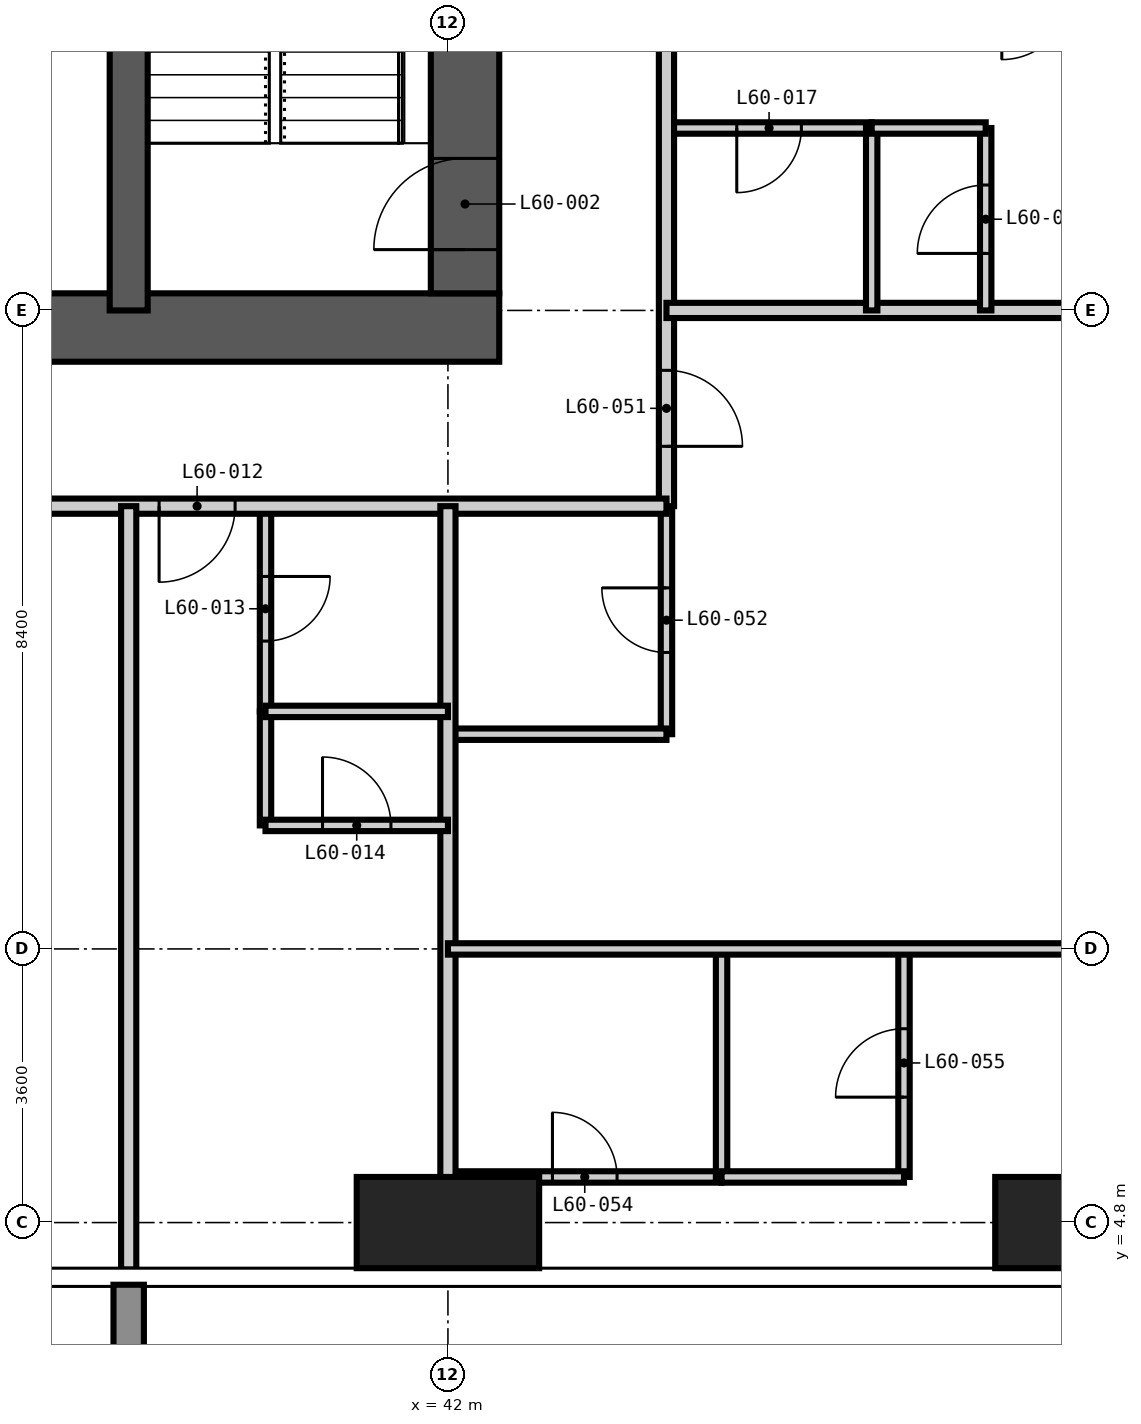
"""IFC4 building model, lengths in metres.
Left out: names, types, materials, properties, quantities, classifications, styles, units other than length and angle.
Written with IfcOpenShell. Run it as: python <this file> out.ifc"""

import sys

from ifc_helpers import new_model, si_unit, direction, frame, frame_2d, origin, origin_2d, place, context, subcontext, project, spatial, rectangle, extrude, element, fill, save


model = new_model("IFC4")
c1 = context("Model", 3, precision=1e-05, world=origin(), true_north=direction((0.0, 1.0)))
c2 = subcontext(c1, "Body", "Model", "MODEL_VIEW")
j1 = project(units=[si_unit("LENGTHUNIT", "METRE"), si_unit("PLANEANGLEUNIT", "RADIAN")], contexts=[c1])
p1 = place(None, origin())
s1 = spatial("IfcSite", under=j1, at=p1, CompositionType="ELEMENT")
p2 = place(p1, origin())
s2 = spatial("IfcBuilding", under=s1, at=p2, CompositionType="ELEMENT")
p3 = place(p2, frame((0.0, 0.0, 233.4)))
s3 = spatial("IfcBuildingStorey", under=s2, at=p3, CompositionType="ELEMENT", Elevation=233.4)
for number, where, z_axis, x_axis in (
    (1, (42.0, 4.8, -0.35), (0.0, 0.0, 1.0), (1.0, 0.0, 0.0)),
    (2, (50.4, 4.8, -0.35), (0.0, 0.0, 1.0), (1.0, 0.0, 0.0)),
):
    element("IfcColumn", number, at=place(p3, frame(where, z_axis=z_axis, x_axis=x_axis)), inside=s3, PredefinedType="COLUMN", context=c2, shape_type="SweptSolid", body=[
        extrude(rectangle(XDim=2.4, YDim=1.2, at=origin_2d()), origin(), (0.0, 0.0, 1.0), 3.9),
    ])
p4 = place(p3, frame((24.525, 16.575, -0.35), z_axis=(0.0, 0.0, 1.0), x_axis=(1.0, 0.0, 0.0)))
e3 = element("IfcWall", 3, at=p4, inside=s3, PredefinedType="SHEAR", context=c2, shape_type="SweptSolid", body=[
    extrude(rectangle(XDim=18.15, YDim=0.9, at=frame_2d((9.075, 0.0))), origin(), (0.0, 0.0, 1.0), 3.9),
])
p5 = place(p4, frame((4.375, 0.0, 0.35)))
e4 = element("IfcOpeningElement", 4, at=p5, cuts=e3, PredefinedType="OPENING", context=c2, shape_type="SweptSolid", body=[
    extrude(rectangle(XDim=1.0, YDim=2.1, at=frame_2d((0.5, 1.05))), frame((0.0, 0.46, 0.0), z_axis=(0.0, -1.0, 0.0), x_axis=(1.0, 0.0, 0.0)), (0.0, 0.0, 1.0), 0.92),
])
p6 = place(p4, frame((10.675, 0.0, 0.35)))
e5 = element("IfcOpeningElement", 5, at=p6, cuts=e3, PredefinedType="OPENING", context=c2, shape_type="SweptSolid", body=[
    extrude(rectangle(XDim=1.0, YDim=2.1, at=frame_2d((0.5, 1.05))), frame((0.0, 0.46, 0.0), z_axis=(0.0, -1.0, 0.0), x_axis=(1.0, 0.0, 0.0)), (0.0, 0.0, 1.0), 0.92),
])
p7 = place(p3, frame((42.225, 17.025, -0.35), z_axis=(0.0, 0.0, 1.0), x_axis=(0.0, 1.0, 0.0)))
e6 = element("IfcWall", 6, at=p7, inside=s3, PredefinedType="SHEAR", context=c2, shape_type="SweptSolid", body=[
    extrude(rectangle(XDim=24.75, YDim=0.9, at=frame_2d((12.375, 0.0))), origin(), (0.0, 0.0, 1.0), 3.9),
])
p8 = place(p7, frame((0.575, 0.0, 0.35)))
e7 = element("IfcOpeningElement", 7, at=p8, cuts=e6, PredefinedType="OPENING", context=c2, shape_type="SweptSolid", body=[
    extrude(rectangle(XDim=1.2, YDim=2.2, at=frame_2d((0.6, 1.1))), frame((0.0, 0.46, 0.0), z_axis=(0.0, -1.0, 0.0), x_axis=(1.0, 0.0, 0.0)), (0.0, 0.0, 1.0), 0.92),
])
p9 = place(p7, frame((11.475, 0.0, 0.35)))
e8 = element("IfcOpeningElement", 8, at=p9, cuts=e6, PredefinedType="OPENING", context=c2, shape_type="SweptSolid", body=[
    extrude(rectangle(XDim=1.8, YDim=2.2, at=frame_2d((0.9, 1.1))), frame((0.0, 0.46, 0.0), z_axis=(0.0, -1.0, 0.0), x_axis=(1.0, 0.0, 0.0)), (0.0, 0.0, 1.0), 0.92),
])
p10 = place(p7, frame((20.275, 0.0, 0.35)))
e9 = element("IfcOpeningElement", 9, at=p10, cuts=e6, PredefinedType="OPENING", context=c2, shape_type="SweptSolid", body=[
    extrude(rectangle(XDim=1.0, YDim=2.1, at=frame_2d((0.5, 1.05))), frame((0.0, 0.46, 0.0), z_axis=(0.0, -1.0, 0.0), x_axis=(1.0, 0.0, 0.0)), (0.0, 0.0, 1.0), 0.92),
])
p11 = place(p3, frame((37.8, 16.8, -0.35), z_axis=(0.0, 0.0, 1.0), x_axis=(0.0, 1.0, 0.0)))
e10 = element("IfcWall", 10, at=p11, inside=s3, PredefinedType="SHEAR", context=c2, shape_type="SweptSolid", body=[
    extrude(rectangle(XDim=11.2, YDim=0.5, at=frame_2d((5.6, 0.0))), origin(), (0.0, 0.0, 1.0), 3.9),
])
p12 = place(p3, frame((39.6, 11.525, 0.0), z_axis=(0.0, 0.0, 1.0), x_axis=(0.0, 1.0, 0.0)))
e11 = element("IfcWall", 11, at=p12, inside=s3, PredefinedType="PARTITIONING", context=c2, shape_type="SweptSolid", body=[
    extrude(rectangle(XDim=2.7, YDim=0.15, at=frame_2d((1.35, 0.0))), origin(), (0.0, 0.0, 1.0), 3.55),
])
p13 = place(p12, frame((0.925, 0.0, 0.0)))
e12 = element("IfcOpeningElement", 12, at=p13, cuts=e11, PredefinedType="OPENING", context=c2, shape_type="SweptSolid", body=[
    extrude(rectangle(XDim=0.85, YDim=2.1, at=frame_2d((0.425, 1.05))), frame((0.0, 0.085, 0.0), z_axis=(0.0, -1.0, 0.0), x_axis=(1.0, 0.0, 0.0)), (0.0, 0.0, 1.0), 0.17),
])
p14 = place(p3, frame((44.875, 11.225, 0.0), z_axis=(0.0, 0.0, 1.0), x_axis=(0.0, 1.0, 0.0)))
e13 = element("IfcWall", 13, at=p14, inside=s3, PredefinedType="PARTITIONING", context=c2, shape_type="SweptSolid", body=[
    extrude(rectangle(XDim=3.0, YDim=0.15, at=frame_2d((1.5, 0.0))), origin(), (0.0, 0.0, 1.0), 3.55),
])
p15 = place(p14, frame((1.075, 0.0, 0.0)))
e14 = element("IfcOpeningElement", 14, at=p15, cuts=e13, PredefinedType="OPENING", context=c2, shape_type="SweptSolid", body=[
    extrude(rectangle(XDim=0.85, YDim=2.1, at=frame_2d((0.425, 1.05))), frame((0.0, 0.085, 0.0), z_axis=(0.0, -1.0, 0.0), x_axis=(1.0, 0.0, 0.0)), (0.0, 0.0, 1.0), 0.17),
])
p16 = place(p3, frame((42.0, 5.4, 0.0), z_axis=(0.0, 0.0, 1.0), x_axis=(1.0, 0.0, 0.0)))
e15 = element("IfcWall", 15, at=p16, inside=s3, PredefinedType="PARTITIONING", context=c2, shape_type="SweptSolid", body=[
    extrude(rectangle(XDim=3.6, YDim=0.15, at=frame_2d((1.8, 0.0))), origin(), (0.0, 0.0, 1.0), 3.55),
])
p17 = place(p16, frame((1.375, 0.0, 0.0)))
e16 = element("IfcOpeningElement", 16, at=p17, cuts=e15, PredefinedType="OPENING", context=c2, shape_type="SweptSolid", body=[
    extrude(rectangle(XDim=0.85, YDim=2.1, at=frame_2d((0.425, 1.05))), frame((0.0, 0.085, 0.0), z_axis=(0.0, -1.0, 0.0), x_axis=(1.0, 0.0, 0.0)), (0.0, 0.0, 1.0), 0.17),
])
p18 = place(p3, frame((42.0, 11.225, 0.0), z_axis=(0.0, 0.0, 1.0), x_axis=(1.0, 0.0, 0.0)))
e17 = element("IfcWall", 17, at=p18, inside=s3, PredefinedType="PARTITIONING", context=c2, shape_type="SweptSolid", body=[
    extrude(rectangle(XDim=2.875, YDim=0.15, at=frame_2d((1.438, 0.0))), origin(), (0.0, 0.0, 1.0), 3.55),
])
p19 = place(p3, frame((44.875, 19.2, 0.0), z_axis=(0.0, 0.0, 1.0), x_axis=(1.0, 0.0, 0.0)))
e18 = element("IfcWall", 18, at=p19, inside=s3, PredefinedType="PARTITIONING", context=c2, shape_type="SweptSolid", body=[
    extrude(rectangle(XDim=2.7, YDim=0.15, at=frame_2d((1.35, 0.0))), origin(), (0.0, 0.0, 1.0), 3.55),
])
p20 = place(p19, frame((0.925, 0.0, 0.0)))
e19 = element("IfcOpeningElement", 19, at=p20, cuts=e18, PredefinedType="OPENING", context=c2, shape_type="SweptSolid", body=[
    extrude(rectangle(XDim=0.85, YDim=2.1, at=frame_2d((0.425, 1.05))), frame((0.0, 0.085, 0.0), z_axis=(0.0, -1.0, 0.0), x_axis=(1.0, 0.0, 0.0)), (0.0, 0.0, 1.0), 0.17),
])
p21 = place(p3, frame((44.875, 29.4, 0.0), z_axis=(0.0, 0.0, 1.0), x_axis=(0.0, -1.0, 0.0)))
e20 = element("IfcWall", 20, at=p21, inside=s3, PredefinedType="PARTITIONING", context=c2, shape_type="SweptSolid", body=[
    extrude(rectangle(XDim=15.175, YDim=0.2, at=frame_2d((7.587, 0.0))), origin(), (0.0, 0.0, 1.0), 3.55),
])
p22 = place(p21, frame((5.8, 0.0, 0.0)))
e21 = element("IfcOpeningElement", 21, at=p22, cuts=e20, PredefinedType="OPENING", context=c2, shape_type="SweptSolid", body=[
    extrude(rectangle(XDim=1.0, YDim=2.2, at=frame_2d((0.5, 1.1))), frame((0.0, 0.11, 0.0), z_axis=(0.0, -1.0, 0.0), x_axis=(1.0, 0.0, 0.0)), (0.0, 0.0, 1.0), 0.22),
])
p23 = place(p21, frame((13.388, 0.0, 0.0)))
e22 = element("IfcOpeningElement", 22, at=p23, cuts=e20, PredefinedType="OPENING", context=c2, shape_type="SweptSolid", body=[
    extrude(rectangle(XDim=1.0, YDim=2.2, at=frame_2d((0.5, 1.1))), frame((0.0, 0.11, 0.0), z_axis=(0.0, -1.0, 0.0), x_axis=(1.0, 0.0, 0.0)), (0.0, 0.0, 1.0), 0.22),
])
p24 = place(p3, frame((44.875, 14.225, 0.0), z_axis=(0.0, 0.0, 1.0), x_axis=(-1.0, 0.0, 0.0)))
e23 = element("IfcWall", 23, at=p24, inside=s3, PredefinedType="PARTITIONING", context=c2, shape_type="SweptSolid", body=[
    extrude(rectangle(XDim=22.25, YDim=0.2, at=frame_2d((11.125, 0.0))), origin(), (0.0, 0.0, 1.0), 3.55),
])
p25 = place(p24, frame((15.875, 0.0, 0.0)))
e24 = element("IfcOpeningElement", 24, at=p25, cuts=e23, PredefinedType="OPENING", context=c2, shape_type="SweptSolid", body=[
    extrude(rectangle(XDim=1.0, YDim=2.2, at=frame_2d((0.5, 1.1))), frame((0.0, 0.11, 0.0), z_axis=(0.0, -1.0, 0.0), x_axis=(1.0, 0.0, 0.0)), (0.0, 0.0, 1.0), 0.22),
])
p26 = place(p24, frame((9.425, 0.0, 0.0)))
e25 = element("IfcOpeningElement", 25, at=p26, cuts=e23, PredefinedType="OPENING", context=c2, shape_type="SweptSolid", body=[
    extrude(rectangle(XDim=1.0, YDim=2.2, at=frame_2d((0.5, 1.1))), frame((0.0, 0.11, 0.0), z_axis=(0.0, -1.0, 0.0), x_axis=(1.0, 0.0, 0.0)), (0.0, 0.0, 1.0), 0.22),
])
p27 = place(p24, frame((5.675, 0.0, 0.0)))
e26 = element("IfcOpeningElement", 26, at=p27, cuts=e23, PredefinedType="OPENING", context=c2, shape_type="SweptSolid", body=[
    extrude(rectangle(XDim=1.0, YDim=2.2, at=frame_2d((0.5, 1.1))), frame((0.0, 0.11, 0.0), z_axis=(0.0, -1.0, 0.0), x_axis=(1.0, 0.0, 0.0)), (0.0, 0.0, 1.0), 0.22),
])
for number, where, z_axis, x_axis in (
    (27, (37.8, 4.182, 0.0), (0.0, 0.0, 1.0), (0.0, 1.0, 0.0)),
    (28, (42.0, 4.182, 0.0), (0.0, 0.0, 1.0), (0.0, 1.0, 0.0)),
):
    element("IfcWall", number, at=place(p3, frame(where, z_axis=z_axis, x_axis=x_axis)), inside=s3, PredefinedType="PARTITIONING", context=c2, shape_type="SweptSolid", body=[
        extrude(rectangle(XDim=10.043, YDim=0.2, at=frame_2d((5.021, 0.0))), origin(), (0.0, 0.0, 1.0), 3.55),
    ])
p28 = place(p3, frame((44.875, 16.8, 0.0), z_axis=(0.0, 0.0, 1.0), x_axis=(1.0, 0.0, 0.0)))
e29 = element("IfcWall", 29, at=p28, inside=s3, PredefinedType="PARTITIONING", context=c2, shape_type="SweptSolid", body=[
    extrude(rectangle(XDim=9.743, YDim=0.2, at=frame_2d((4.872, 0.0))), origin(), (0.0, 0.0, 1.0), 3.55),
])
p29 = place(p3, frame((39.6, 10.025, 0.0), z_axis=(0.0, 0.0, 1.0), x_axis=(0.0, 1.0, 0.0)))
e30 = element("IfcWall", 30, at=p29, inside=s3, PredefinedType="PARTITIONING", context=c2, shape_type="SweptSolid", body=[
    extrude(rectangle(XDim=1.5, YDim=0.15, at=frame_2d((0.75, 0.0))), origin(), (0.0, 0.0, 1.0), 3.55),
])
p30 = place(p3, frame((45.6, 5.4, 0.0), z_axis=(0.0, 0.0, 1.0), x_axis=(0.0, 1.0, 0.0)))
e31 = element("IfcWall", 31, at=p30, inside=s3, PredefinedType="PARTITIONING", context=c2, shape_type="SweptSolid", body=[
    extrude(rectangle(XDim=3.0, YDim=0.15, at=frame_2d((1.5, 0.0))), origin(), (0.0, 0.0, 1.0), 3.55),
])
p31 = place(p3, frame((47.575, 16.8, 0.0), z_axis=(0.0, 0.0, 1.0), x_axis=(0.0, 1.0, 0.0)))
e32 = element("IfcWall", 32, at=p31, inside=s3, PredefinedType="PARTITIONING", context=c2, shape_type="SweptSolid", body=[
    extrude(rectangle(XDim=2.4, YDim=0.15, at=frame_2d((1.2, 0.0))), origin(), (0.0, 0.0, 1.0), 3.55),
])
p32 = place(p3, frame((48.0, 5.4, 0.0), z_axis=(0.0, 0.0, 1.0), x_axis=(0.0, 1.0, 0.0)))
e33 = element("IfcWall", 33, at=p32, inside=s3, PredefinedType="PARTITIONING", context=c2, shape_type="SweptSolid", body=[
    extrude(rectangle(XDim=3.0, YDim=0.15, at=frame_2d((1.5, 0.0))), origin(), (0.0, 0.0, 1.0), 3.55),
])
p33 = place(p32, frame((1.05, 0.0, 0.0)))
e34 = element("IfcOpeningElement", 34, at=p33, cuts=e33, PredefinedType="OPENING", context=c2, shape_type="SweptSolid", body=[
    extrude(rectangle(XDim=0.9, YDim=2.1, at=frame_2d((0.45, 1.05))), frame((0.0, 0.085, 0.0), z_axis=(0.0, -1.0, 0.0), x_axis=(1.0, 0.0, 0.0)), (0.0, 0.0, 1.0), 0.17),
])
p34 = place(p3, frame((49.075, 16.8, 0.0), z_axis=(0.0, 0.0, 1.0), x_axis=(0.0, 1.0, 0.0)))
e35 = element("IfcWall", 35, at=p34, inside=s3, PredefinedType="PARTITIONING", context=c2, shape_type="SweptSolid", body=[
    extrude(rectangle(XDim=2.4, YDim=0.15, at=frame_2d((1.2, 0.0))), origin(), (0.0, 0.0, 1.0), 3.55),
])
p35 = place(p34, frame((0.75, 0.0, 0.0)))
e36 = element("IfcOpeningElement", 36, at=p35, cuts=e35, PredefinedType="OPENING", context=c2, shape_type="SweptSolid", body=[
    extrude(rectangle(XDim=0.9, YDim=2.1, at=frame_2d((0.45, 1.05))), frame((0.0, 0.085, 0.0), z_axis=(0.0, -1.0, 0.0), x_axis=(1.0, 0.0, 0.0)), (0.0, 0.0, 1.0), 0.17),
])
p36 = place(p3, frame((45.6, 5.4, 0.0), z_axis=(0.0, 0.0, 1.0), x_axis=(1.0, 0.0, 0.0)))
e37 = element("IfcWall", 37, at=p36, inside=s3, PredefinedType="PARTITIONING", context=c2, shape_type="SweptSolid", body=[
    extrude(rectangle(XDim=2.4, YDim=0.15, at=frame_2d((1.2, 0.0))), origin(), (0.0, 0.0, 1.0), 3.55),
])
p37 = place(p3, frame((42.0, 8.4, 0.0), z_axis=(0.0, 0.0, 1.0), x_axis=(1.0, 0.0, 0.0)))
e38 = element("IfcWall", 38, at=p37, inside=s3, PredefinedType="PARTITIONING", context=c2, shape_type="SweptSolid", body=[
    extrude(rectangle(XDim=12.618, YDim=0.15, at=frame_2d((6.309, 0.0))), origin(), (0.0, 0.0, 1.0), 3.55),
])
p38 = place(p37, frame((8.85, 0.0, 0.0)))
e39 = element("IfcOpeningElement", 39, at=p38, cuts=e38, PredefinedType="OPENING", context=c2, shape_type="SweptSolid", body=[
    extrude(rectangle(XDim=0.9, YDim=2.1, at=frame_2d((0.45, 1.05))), frame((0.0, 0.085, 0.0), z_axis=(0.0, -1.0, 0.0), x_axis=(1.0, 0.0, 0.0)), (0.0, 0.0, 1.0), 0.17),
])
p39 = place(p3, frame((39.6, 10.025, 0.0), z_axis=(0.0, 0.0, 1.0), x_axis=(1.0, 0.0, 0.0)))
e40 = element("IfcWall", 40, at=p39, inside=s3, PredefinedType="PARTITIONING", context=c2, shape_type="SweptSolid", body=[
    extrude(rectangle(XDim=2.4, YDim=0.15, at=frame_2d((1.2, 0.0))), origin(), (0.0, 0.0, 1.0), 3.55),
])
p40 = place(p39, frame((0.75, 0.0, 0.0)))
e41 = element("IfcOpeningElement", 41, at=p40, cuts=e40, PredefinedType="OPENING", context=c2, shape_type="SweptSolid", body=[
    extrude(rectangle(XDim=0.9, YDim=2.1, at=frame_2d((0.45, 1.05))), frame((0.0, 0.085, 0.0), z_axis=(0.0, -1.0, 0.0), x_axis=(1.0, 0.0, 0.0)), (0.0, 0.0, 1.0), 0.17),
])
p41 = place(p3, frame((39.6, 11.525, 0.0), z_axis=(0.0, 0.0, 1.0), x_axis=(1.0, 0.0, 0.0)))
e42 = element("IfcWall", 42, at=p41, inside=s3, PredefinedType="PARTITIONING", context=c2, shape_type="SweptSolid", body=[
    extrude(rectangle(XDim=2.4, YDim=0.15, at=frame_2d((1.2, 0.0))), origin(), (0.0, 0.0, 1.0), 3.55),
])
p42 = place(p3, frame((47.575, 19.2, 0.0), z_axis=(0.0, 0.0, 1.0), x_axis=(1.0, 0.0, 0.0)))
e43 = element("IfcWall", 43, at=p42, inside=s3, PredefinedType="PARTITIONING", context=c2, shape_type="SweptSolid", body=[
    extrude(rectangle(XDim=1.5, YDim=0.15, at=frame_2d((0.75, 0.0))), origin(), (0.0, 0.0, 1.0), 3.55),
])
p43 = place(p8, origin())
e44 = element("IfcDoor", 44, at=p43, inside=s3, OperationType="SINGLE_SWING_LEFT", PredefinedType="DOOR", context=c2, shape_type="SweptSolid", body=[
    extrude(rectangle(XDim=1.2, YDim=2.2, at=frame_2d((0.6, 1.1))), frame((0.0, 0.025, 0.0), z_axis=(0.0, -1.0, 0.0), x_axis=(1.0, 0.0, 0.0)), (0.0, 0.0, 1.0), 0.05),
])
fill(e7, e44)
p44 = place(p27, origin())
e45 = element("IfcDoor", 45, at=p44, inside=s3, OperationType="SINGLE_SWING_RIGHT", PredefinedType="DOOR", context=c2, shape_type="SweptSolid", body=[
    extrude(rectangle(XDim=1.0, YDim=2.2, at=frame_2d((0.5, 1.1))), frame((0.0, 0.025, 0.0), z_axis=(0.0, -1.0, 0.0), x_axis=(1.0, 0.0, 0.0)), (0.0, 0.0, 1.0), 0.05),
])
fill(e26, e45)
p45 = place(p13, frame((0.85, 0.0, 0.0), z_axis=(0.0, 0.0, 1.0), x_axis=(-1.0, 0.0, 0.0)))
e46 = element("IfcDoor", 46, at=p45, inside=s3, OperationType="SINGLE_SWING_LEFT", PredefinedType="DOOR", context=c2, shape_type="SweptSolid", body=[
    extrude(rectangle(XDim=0.85, YDim=2.1, at=frame_2d((0.425, 1.05))), frame((0.0, 0.025, 0.0), z_axis=(0.0, -1.0, 0.0), x_axis=(1.0, 0.0, 0.0)), (0.0, 0.0, 1.0), 0.05),
])
fill(e12, e46)
p46 = place(p40, origin())
e47 = element("IfcDoor", 47, at=p46, inside=s3, OperationType="SINGLE_SWING_LEFT", PredefinedType="DOOR", context=c2, shape_type="SweptSolid", body=[
    extrude(rectangle(XDim=0.9, YDim=2.1, at=frame_2d((0.45, 1.05))), frame((0.0, 0.025, 0.0), z_axis=(0.0, -1.0, 0.0), x_axis=(1.0, 0.0, 0.0)), (0.0, 0.0, 1.0), 0.05),
])
fill(e41, e47)
p47 = place(p20, frame((0.85, 0.0, 0.0), z_axis=(0.0, 0.0, 1.0), x_axis=(-1.0, 0.0, 0.0)))
e48 = element("IfcDoor", 48, at=p47, inside=s3, OperationType="SINGLE_SWING_RIGHT", PredefinedType="DOOR", context=c2, shape_type="SweptSolid", body=[
    extrude(rectangle(XDim=0.85, YDim=2.1, at=frame_2d((0.425, 1.05))), frame((0.0, 0.025, 0.0), z_axis=(0.0, -1.0, 0.0), x_axis=(1.0, 0.0, 0.0)), (0.0, 0.0, 1.0), 0.05),
])
fill(e19, e48)
p48 = place(p35, origin())
e49 = element("IfcDoor", 49, at=p48, inside=s3, OperationType="SINGLE_SWING_LEFT", PredefinedType="DOOR", context=c2, shape_type="SweptSolid", body=[
    extrude(rectangle(XDim=0.9, YDim=2.1, at=frame_2d((0.45, 1.05))), frame((0.0, 0.025, 0.0), z_axis=(0.0, -1.0, 0.0), x_axis=(1.0, 0.0, 0.0)), (0.0, 0.0, 1.0), 0.05),
])
fill(e36, e49)
p49 = place(p23, origin())
e50 = element("IfcDoor", 50, at=p49, inside=s3, OperationType="SINGLE_SWING_RIGHT", PredefinedType="DOOR", context=c2, shape_type="SweptSolid", body=[
    extrude(rectangle(XDim=1.0, YDim=2.2, at=frame_2d((0.5, 1.1))), frame((0.0, 0.025, 0.0), z_axis=(0.0, -1.0, 0.0), x_axis=(1.0, 0.0, 0.0)), (0.0, 0.0, 1.0), 0.05),
])
fill(e22, e50)
p50 = place(p15, origin())
e51 = element("IfcDoor", 51, at=p50, inside=s3, OperationType="SINGLE_SWING_RIGHT", PredefinedType="DOOR", context=c2, shape_type="SweptSolid", body=[
    extrude(rectangle(XDim=0.85, YDim=2.1, at=frame_2d((0.425, 1.05))), frame((0.0, 0.025, 0.0), z_axis=(0.0, -1.0, 0.0), x_axis=(1.0, 0.0, 0.0)), (0.0, 0.0, 1.0), 0.05),
])
fill(e14, e51)
p51 = place(p17, origin())
e52 = element("IfcDoor", 52, at=p51, inside=s3, OperationType="SINGLE_SWING_LEFT", PredefinedType="DOOR", context=c2, shape_type="SweptSolid", body=[
    extrude(rectangle(XDim=0.85, YDim=2.1, at=frame_2d((0.425, 1.05))), frame((0.0, 0.025, 0.0), z_axis=(0.0, -1.0, 0.0), x_axis=(1.0, 0.0, 0.0)), (0.0, 0.0, 1.0), 0.05),
])
fill(e16, e52)
p52 = place(p33, origin())
e53 = element("IfcDoor", 53, at=p52, inside=s3, OperationType="SINGLE_SWING_LEFT", PredefinedType="DOOR", context=c2, shape_type="SweptSolid", body=[
    extrude(rectangle(XDim=0.9, YDim=2.1, at=frame_2d((0.45, 1.05))), frame((0.0, 0.025, 0.0), z_axis=(0.0, -1.0, 0.0), x_axis=(1.0, 0.0, 0.0)), (0.0, 0.0, 1.0), 0.05),
])
fill(e34, e53)
save(model, sys.argv[1])
